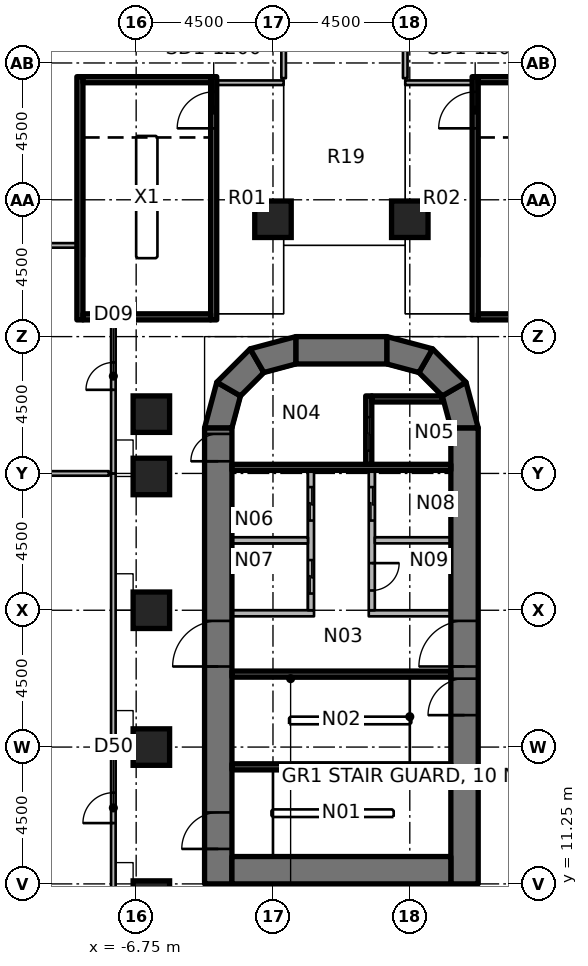
"""IFC4 building model, lengths in metres.
Left out: names, types, materials, properties, quantities, classifications, styles, units other than length and angle.
Written with IfcOpenShell. Run it as: python <this file> out.ifc"""

import sys

from ifc_helpers import new_model, si_unit, direction, frame, frame_2d, origin, origin_2d, place, context, subcontext, project, spatial, polyline, rectangle, outline, extrude, element, fill, save


model = new_model("IFC4")
c1 = context("Model", 3, precision=1e-05, world=origin(), true_north=direction((0.0, 1.0)))
c2 = subcontext(c1, "Body", "Model", "MODEL_VIEW")
j1 = project(units=[si_unit("LENGTHUNIT", "METRE"), si_unit("PLANEANGLEUNIT", "RADIAN")], contexts=[c1])
p1 = place(None, origin())
s1 = spatial("IfcSite", under=j1, at=p1, CompositionType="ELEMENT")
p2 = place(p1, origin())
s2 = spatial("IfcBuilding", under=s1, at=p2, CompositionType="ELEMENT")
p3 = place(p2, frame((0.0, 0.0, 12.0)))
s3 = spatial("IfcBuildingStorey", under=s2, at=p3, CompositionType="ELEMENT", Elevation=12.0)
for number, where, z_axis, x_axis in (
    (1, (-6.25, 10.75, 0.0), (0.0, 0.0, 1.0), (1.0, 0.0, 0.0)),
    (2, (-6.25, 15.75, 0.0), (0.0, 0.0, 1.0), (1.0, 0.0, 0.0)),
    (3, (-6.25, 20.25, 0.0), (0.0, 0.0, 1.0), (1.0, 0.0, 0.0)),
    (4, (-6.25, 24.65, 0.0), (0.0, 0.0, 1.0), (1.0, 0.0, 0.0)),
    (5, (-6.25, 26.7, 0.0), (0.0, 0.0, 1.0), (1.0, 0.0, 0.0)),
    (6, (-2.25, 33.11, 0.0), (0.0, 0.0, 1.0), (1.0, 0.0, 0.0)),
    (7, (2.25, 33.11, 0.0), (0.0, 0.0, 1.0), (1.0, 0.0, 0.0)),
):
    element("IfcColumn", number, at=place(p3, frame(where, z_axis=z_axis, x_axis=x_axis)), inside=s3, PredefinedType="COLUMN", context=c2, shape_type="SweptSolid", body=[
        extrude(rectangle(XDim=1.2, YDim=1.2, at=origin_2d()), origin(), (0.0, 0.0, 1.0), 4.55),
    ])
p4 = place(p3, frame((-4.05, 11.25, 0.0), z_axis=(0.0, 0.0, 1.0), x_axis=(0.0, 1.0, 0.0)))
e8 = element("IfcWall", 8, at=p4, inside=s3, PredefinedType="SHEAR", context=c2, shape_type="SweptSolid", body=[
    extrude(rectangle(XDim=15.0, YDim=0.9, at=frame_2d((7.5, 0.0))), origin(), (0.0, 0.0, 1.0), 5.0),
])
p5 = place(p4, frame((7.15, 0.0, 0.0)))
e9 = element("IfcOpeningElement", 9, at=p5, cuts=e8, PredefinedType="OPENING", context=c2, shape_type="SweptSolid", body=[
    extrude(rectangle(XDim=1.5, YDim=2.3, at=frame_2d((0.75, 1.15))), frame((0.0, 0.46, 0.0), z_axis=(0.0, -1.0, 0.0), x_axis=(1.0, 0.0, 0.0)), (0.0, 0.0, 1.0), 0.92),
])
p6 = place(p4, frame((13.9, 0.0, 0.0)))
e10 = element("IfcOpeningElement", 10, at=p6, cuts=e8, PredefinedType="OPENING", context=c2, shape_type="SweptSolid", body=[
    extrude(rectangle(XDim=0.9, YDim=2.1, at=frame_2d((0.45, 1.05))), frame((0.0, 0.46, 0.0), z_axis=(0.0, -1.0, 0.0), x_axis=(1.0, 0.0, 0.0)), (0.0, 0.0, 1.0), 0.92),
])
p7 = place(p4, frame((1.15, 0.0, 0.0)))
e11 = element("IfcOpeningElement", 11, at=p7, cuts=e8, PredefinedType="OPENING", context=c2, shape_type="SweptSolid", body=[
    extrude(rectangle(XDim=1.2, YDim=2.1, at=frame_2d((0.6, 1.05))), frame((0.0, 0.46, 0.0), z_axis=(0.0, -1.0, 0.0), x_axis=(1.0, 0.0, 0.0)), (0.0, 0.0, 1.0), 0.92),
])
p8 = place(p3, frame((4.05, 11.25, 0.0), z_axis=(0.0, 0.0, 1.0), x_axis=(0.0, 1.0, 0.0)))
e12 = element("IfcWall", 12, at=p8, inside=s3, PredefinedType="SHEAR", context=c2, shape_type="SweptSolid", body=[
    extrude(rectangle(XDim=15.0, YDim=0.9, at=frame_2d((7.5, 0.0))), origin(), (0.0, 0.0, 1.0), 5.0),
])
p9 = place(p8, frame((7.15, 0.0, 0.0)))
e13 = element("IfcOpeningElement", 13, at=p9, cuts=e12, PredefinedType="OPENING", context=c2, shape_type="SweptSolid", body=[
    extrude(rectangle(XDim=1.5, YDim=2.3, at=frame_2d((0.75, 1.15))), frame((0.0, 0.46, 0.0), z_axis=(0.0, -1.0, 0.0), x_axis=(1.0, 0.0, 0.0)), (0.0, 0.0, 1.0), 0.92),
])
p10 = place(p8, frame((5.55, 0.0, 0.0)))
e14 = element("IfcOpeningElement", 14, at=p10, cuts=e12, PredefinedType="OPENING", context=c2, shape_type="SweptSolid", body=[
    extrude(rectangle(XDim=1.2, YDim=2.1, at=frame_2d((0.6, 1.05))), frame((0.0, 0.46, 0.0), z_axis=(0.0, -1.0, 0.0), x_axis=(1.0, 0.0, 0.0)), (0.0, 0.0, 1.0), 0.92),
])
p11 = place(p3, frame((-3.6, 11.7, 0.0), z_axis=(0.0, 0.0, 1.0), x_axis=(1.0, 0.0, 0.0)))
e15 = element("IfcWall", 15, at=p11, inside=s3, PredefinedType="SHEAR", context=c2, shape_type="SweptSolid", body=[
    extrude(rectangle(XDim=7.2, YDim=0.9, at=frame_2d((3.6, 0.0))), origin(), (0.0, 0.0, 1.0), 5.0),
])
p12 = place(p3, frame((-1.5, 28.8, 0.0), z_axis=(0.0, 0.0, 1.0), x_axis=(1.0, 0.0, 0.0)))
e16 = element("IfcWall", 16, at=p12, inside=s3, PredefinedType="SHEAR", context=c2, shape_type="SweptSolid", body=[
    extrude(rectangle(XDim=3.0, YDim=0.9, at=frame_2d((1.5, 0.0))), origin(), (0.0, 0.0, 1.0), 5.0),
])
p13 = place(p3, origin())
e17 = element("IfcWall", 17, at=p13, inside=s3, PredefinedType="SHEAR", context=c2, shape_type="SweptSolid", body=[
    extrude(outline(polyline([(-4.5, 26.25), (-4.098, 27.75), (-3.319, 27.3), (-3.6, 26.25), (-4.5, 26.25)])), origin(), (0.0, 0.0, 1.0), 5.0),
])
p14 = place(p3, origin())
e18 = element("IfcWall", 18, at=p14, inside=s3, PredefinedType="SHEAR", context=c2, shape_type="SweptSolid", body=[
    extrude(outline(polyline([(-4.098, 27.75), (-3.0, 28.848), (-2.55, 28.069), (-3.319, 27.3), (-4.098, 27.75)])), origin(), (0.0, 0.0, 1.0), 5.0),
])
p15 = place(p3, origin())
e19 = element("IfcWall", 19, at=p15, inside=s3, PredefinedType="SHEAR", context=c2, shape_type="SweptSolid", body=[
    extrude(outline(polyline([(-3.0, 28.848), (-1.5, 29.25), (-1.5, 28.35), (-2.55, 28.069), (-3.0, 28.848)])), origin(), (0.0, 0.0, 1.0), 5.0),
])
p16 = place(p3, origin())
e20 = element("IfcWall", 20, at=p16, inside=s3, PredefinedType="SHEAR", context=c2, shape_type="SweptSolid", body=[
    extrude(outline(polyline([(4.5, 26.25), (4.098, 27.75), (3.319, 27.3), (3.6, 26.25), (4.5, 26.25)])), origin(), (0.0, 0.0, 1.0), 5.0),
])
p17 = place(p3, origin())
e21 = element("IfcWall", 21, at=p17, inside=s3, PredefinedType="SHEAR", context=c2, shape_type="SweptSolid", body=[
    extrude(outline(polyline([(4.098, 27.75), (3.0, 28.848), (2.55, 28.069), (3.319, 27.3), (4.098, 27.75)])), origin(), (0.0, 0.0, 1.0), 5.0),
])
p18 = place(p3, origin())
e22 = element("IfcWall", 22, at=p18, inside=s3, PredefinedType="SHEAR", context=c2, shape_type="SweptSolid", body=[
    extrude(outline(polyline([(3.0, 28.848), (1.5, 29.25), (1.5, 28.35), (2.55, 28.069), (3.0, 28.848)])), origin(), (0.0, 0.0, 1.0), 5.0),
])
p19 = place(p3, frame((-3.6, 24.95, 0.0), z_axis=(0.0, 0.0, 1.0), x_axis=(1.0, 0.0, 0.0)))
e23 = element("IfcWall", 23, at=p19, inside=s3, PredefinedType="SHEAR", context=c2, shape_type="SweptSolid", body=[
    extrude(rectangle(XDim=7.2, YDim=0.2, at=frame_2d((3.6, 0.0))), origin(), (0.0, 0.0, 1.0), 4.55),
])
p20 = place(p3, frame((0.9, 27.3, 0.0), z_axis=(0.0, 0.0, 1.0), x_axis=(0.0, -1.0, 0.0)))
e24 = element("IfcWall", 24, at=p20, inside=s3, PredefinedType="SHEAR", context=c2, shape_type="SweptSolid", body=[
    extrude(rectangle(XDim=2.25, YDim=0.2, at=frame_2d((1.125, 0.0))), origin(), (0.0, 0.0, 1.0), 4.55),
])
p21 = place(p20, frame((0.7, 0.0, 0.0)))
e25 = element("IfcOpeningElement", 25, at=p21, cuts=e24, PredefinedType="OPENING", context=c2, shape_type="SweptSolid", body=[
    extrude(rectangle(XDim=1.1, YDim=2.3, at=frame_2d((0.55, 1.15))), frame((0.0, 0.11, 0.0), z_axis=(0.0, -1.0, 0.0), x_axis=(1.0, 0.0, 0.0)), (0.0, 0.0, 1.0), 0.22),
])
p22 = place(p3, origin())
e26 = element("IfcWall", 26, at=p22, inside=s3, PredefinedType="SHEAR", context=c2, shape_type="SweptSolid", body=[
    extrude(outline(polyline([(1.0, 27.1), (3.341, 27.1), (3.291, 27.284), (3.275, 27.3), (1.0, 27.3), (1.0, 27.1)])), origin(), (0.0, 0.0, 1.0), 4.55),
])
for number, where, z_axis, x_axis in (
    (27, (-3.6, 18.15, 0.0), (0.0, 0.0, 1.0), (1.0, 0.0, 0.0)),
    (28, (-3.6, 15.1, 0.0), (0.0, 0.0, 1.0), (1.0, 0.0, 0.0)),
):
    element("IfcWall", number, at=place(p3, frame(where, z_axis=z_axis, x_axis=x_axis)), inside=s3, PredefinedType="SHEAR", context=c2, shape_type="SweptSolid", body=[
        extrude(rectangle(XDim=7.2, YDim=0.2, at=frame_2d((3.6, 0.0))), origin(), (0.0, 0.0, 1.0), 4.55),
    ])
p23 = place(p3, frame((-3.6, 20.15, 0.0), z_axis=(0.0, 0.0, 1.0), x_axis=(1.0, 0.0, 0.0)))
e29 = element("IfcWall", 29, at=p23, inside=s3, PredefinedType="PARTITIONING", context=c2, shape_type="SweptSolid", body=[
    extrude(rectangle(XDim=2.7, YDim=0.2, at=frame_2d((1.35, 0.0))), origin(), (0.0, 0.0, 1.0), 4.55),
])
p24 = place(p3, frame((-1.0, 24.85, 0.0), z_axis=(0.0, 0.0, 1.0), x_axis=(0.0, -1.0, 0.0)))
e30 = element("IfcWall", 30, at=p24, inside=s3, PredefinedType="PARTITIONING", context=c2, shape_type="SweptSolid", body=[
    extrude(rectangle(XDim=4.6, YDim=0.2, at=frame_2d((2.3, 0.0))), origin(), (0.0, 0.0, 1.0), 4.55),
])
p25 = place(p24, frame((0.55, 0.0, 0.0)))
e31 = element("IfcOpeningElement", 31, at=p25, cuts=e30, PredefinedType="OPENING", context=c2, shape_type="SweptSolid", body=[
    extrude(rectangle(XDim=1.1, YDim=2.3, at=frame_2d((0.55, 1.15))), frame((0.0, 0.11, 0.0), z_axis=(0.0, -1.0, 0.0), x_axis=(1.0, 0.0, 0.0)), (0.0, 0.0, 1.0), 0.22),
])
p26 = place(p24, frame((2.95, 0.0, 0.0)))
e32 = element("IfcOpeningElement", 32, at=p26, cuts=e30, PredefinedType="OPENING", context=c2, shape_type="SweptSolid", body=[
    extrude(rectangle(XDim=1.1, YDim=2.3, at=frame_2d((0.55, 1.15))), frame((0.0, 0.11, 0.0), z_axis=(0.0, -1.0, 0.0), x_axis=(1.0, 0.0, 0.0)), (0.0, 0.0, 1.0), 0.22),
])
p27 = place(p3, frame((0.9, 20.15, 0.0), z_axis=(0.0, 0.0, 1.0), x_axis=(1.0, 0.0, 0.0)))
e33 = element("IfcWall", 33, at=p27, inside=s3, PredefinedType="PARTITIONING", context=c2, shape_type="SweptSolid", body=[
    extrude(rectangle(XDim=2.7, YDim=0.2, at=frame_2d((1.35, 0.0))), origin(), (0.0, 0.0, 1.0), 4.55),
])
p28 = place(p3, frame((1.0, 24.85, 0.0), z_axis=(0.0, 0.0, 1.0), x_axis=(0.0, -1.0, 0.0)))
e34 = element("IfcWall", 34, at=p28, inside=s3, PredefinedType="PARTITIONING", context=c2, shape_type="SweptSolid", body=[
    extrude(rectangle(XDim=4.6, YDim=0.2, at=frame_2d((2.3, 0.0))), origin(), (0.0, 0.0, 1.0), 4.55),
])
p29 = place(p28, frame((0.55, 0.0, 0.0)))
e35 = element("IfcOpeningElement", 35, at=p29, cuts=e34, PredefinedType="OPENING", context=c2, shape_type="SweptSolid", body=[
    extrude(rectangle(XDim=1.1, YDim=2.3, at=frame_2d((0.55, 1.15))), frame((0.0, 0.11, 0.0), z_axis=(0.0, -1.0, 0.0), x_axis=(1.0, 0.0, 0.0)), (0.0, 0.0, 1.0), 0.22),
])
p30 = place(p28, frame((3.05, 0.0, 0.0)))
e36 = element("IfcOpeningElement", 36, at=p30, cuts=e34, PredefinedType="OPENING", context=c2, shape_type="SweptSolid", body=[
    extrude(rectangle(XDim=0.9, YDim=2.1, at=frame_2d((0.45, 1.05))), frame((0.0, 0.11, 0.0), z_axis=(0.0, -1.0, 0.0), x_axis=(1.0, 0.0, 0.0)), (0.0, 0.0, 1.0), 0.22),
])
for number, where, z_axis, x_axis in (
    (37, (-3.6, 22.55, 0.0), (0.0, 0.0, 1.0), (1.0, 0.0, 0.0)),
    (38, (1.1, 22.55, 0.0), (0.0, 0.0, 1.0), (1.0, 0.0, 0.0)),
):
    element("IfcWall", number, at=place(p3, frame(where, z_axis=z_axis, x_axis=x_axis)), inside=s3, PredefinedType="PARTITIONING", context=c2, shape_type="SweptSolid", body=[
        extrude(rectangle(XDim=2.5, YDim=0.2, at=frame_2d((1.25, 0.0))), origin(), (0.0, 0.0, 1.0), 4.55),
    ])
p31 = place(p3, frame((-8.6, 29.8, 0.0), z_axis=(0.0, 0.0, 1.0), x_axis=(0.0, 1.0, 0.0)))
e39 = element("IfcWall", 39, at=p31, inside=s3, PredefinedType="SHEAR", context=c2, shape_type="SweptSolid", body=[
    extrude(rectangle(XDim=8.0, YDim=0.2, at=frame_2d((4.0, 0.0))), origin(), (0.0, 0.0, 1.0), 4.55),
])
p32 = place(p3, frame((-4.2, 29.8, 0.0), z_axis=(0.0, 0.0, 1.0), x_axis=(0.0, 1.0, 0.0)))
e40 = element("IfcWall", 40, at=p32, inside=s3, PredefinedType="SHEAR", context=c2, shape_type="SweptSolid", body=[
    extrude(rectangle(XDim=8.0, YDim=0.2, at=frame_2d((4.0, 0.0))), origin(), (0.0, 0.0, 1.0), 4.55),
])
p33 = place(p32, frame((6.3, 0.0, 0.0)))
e41 = element("IfcOpeningElement", 41, at=p33, cuts=e40, PredefinedType="OPENING", context=c2, shape_type="SweptSolid", body=[
    extrude(rectangle(XDim=1.2, YDim=2.1, at=frame_2d((0.6, 1.05))), frame((0.0, 0.11, 0.0), z_axis=(0.0, -1.0, 0.0), x_axis=(1.0, 0.0, 0.0)), (0.0, 0.0, 1.0), 0.22),
])
for number, where, z_axis, x_axis in (
    (42, (-8.5, 29.9, 0.0), (0.0, 0.0, 1.0), (1.0, 0.0, 0.0)),
    (43, (-8.5, 37.7, 0.0), (0.0, 0.0, 1.0), (1.0, 0.0, 0.0)),
):
    element("IfcWall", number, at=place(p3, frame(where, z_axis=z_axis, x_axis=x_axis)), inside=s3, PredefinedType="SHEAR", context=c2, shape_type="SweptSolid", body=[
        extrude(rectangle(XDim=4.2, YDim=0.2, at=frame_2d((2.1, 0.0))), origin(), (0.0, 0.0, 1.0), 4.55),
    ])
p34 = place(p3, frame((4.4, 29.8, 0.0), z_axis=(0.0, 0.0, 1.0), x_axis=(0.0, 1.0, 0.0)))
e44 = element("IfcWall", 44, at=p34, inside=s3, PredefinedType="SHEAR", context=c2, shape_type="SweptSolid", body=[
    extrude(rectangle(XDim=8.0, YDim=0.2, at=frame_2d((4.0, 0.0))), origin(), (0.0, 0.0, 1.0), 4.55),
])
p35 = place(p34, frame((6.3, 0.0, 0.0)))
e45 = element("IfcOpeningElement", 45, at=p35, cuts=e44, PredefinedType="OPENING", context=c2, shape_type="SweptSolid", body=[
    extrude(rectangle(XDim=1.2, YDim=2.1, at=frame_2d((0.6, 1.05))), frame((0.0, 0.11, 0.0), z_axis=(0.0, -1.0, 0.0), x_axis=(1.0, 0.0, 0.0)), (0.0, 0.0, 1.0), 0.22),
])
for number, where, z_axis, x_axis in (
    (46, (4.5, 29.9, 0.0), (0.0, 0.0, 1.0), (1.0, 0.0, 0.0)),
    (47, (4.5, 37.7, 0.0), (0.0, 0.0, 1.0), (1.0, 0.0, 0.0)),
):
    element("IfcWall", number, at=place(p3, frame(where, z_axis=z_axis, x_axis=x_axis)), inside=s3, PredefinedType="SHEAR", context=c2, shape_type="SweptSolid", body=[
        extrude(rectangle(XDim=4.2, YDim=0.2, at=frame_2d((2.1, 0.0))), origin(), (0.0, 0.0, 1.0), 4.55),
    ])
p36 = place(p3, frame((-4.1, 37.6, 0.0), z_axis=(0.0, 0.0, 1.0), x_axis=(1.0, 0.0, 0.0)))
e48 = element("IfcWall", 48, at=p36, inside=s3, PredefinedType="PARTITIONING", context=c2, shape_type="SweptSolid", body=[
    extrude(rectangle(XDim=2.2, YDim=0.15, at=frame_2d((1.1, 0.0))), origin(), (0.0, 0.0, 1.0), 4.55),
])
p37 = place(p3, frame((2.1, 37.6, 0.0), z_axis=(0.0, 0.0, 1.0), x_axis=(1.0, 0.0, 0.0)))
e49 = element("IfcWall", 49, at=p37, inside=s3, PredefinedType="PARTITIONING", context=c2, shape_type="SweptSolid", body=[
    extrude(rectangle(XDim=2.2, YDim=0.15, at=frame_2d((1.1, 0.0))), origin(), (0.0, 0.0, 1.0), 4.55),
])
p38 = place(p3, frame((-7.5, 8.25, 0.0), z_axis=(0.0, 0.0, 1.0), x_axis=(0.0, 1.0, 0.0)))
e50 = element("IfcWall", 50, at=p38, inside=s3, PredefinedType="PARTITIONING", context=c2, shape_type="SweptSolid", body=[
    extrude(rectangle(XDim=16.5, YDim=0.15, at=frame_2d((8.25, 0.0))), origin(), (0.0, 0.0, 1.0), 4.55),
])
p39 = place(p38, frame((5.0, 0.0, 0.0)))
e51 = element("IfcOpeningElement", 51, at=p39, cuts=e50, PredefinedType="OPENING", context=c2, shape_type="SweptSolid", body=[
    extrude(rectangle(XDim=1.0, YDim=2.1, at=frame_2d((0.5, 1.05))), frame((0.0, 0.085, 0.0), z_axis=(0.0, -1.0, 0.0), x_axis=(1.0, 0.0, 0.0)), (0.0, 0.0, 1.0), 0.17),
])
p40 = place(p3, frame((-7.5, 24.75, 0.0), z_axis=(0.0, 0.0, 1.0), x_axis=(0.0, 1.0, 0.0)))
e52 = element("IfcWall", 52, at=p40, inside=s3, PredefinedType="PARTITIONING", context=c2, shape_type="SweptSolid", body=[
    extrude(rectangle(XDim=5.25, YDim=0.15, at=frame_2d((2.625, 0.0))), origin(), (0.0, 0.0, 1.0), 4.55),
])
p41 = place(p40, frame((2.75, 0.0, 0.0)))
e53 = element("IfcOpeningElement", 53, at=p41, cuts=e52, PredefinedType="OPENING", context=c2, shape_type="SweptSolid", body=[
    extrude(rectangle(XDim=0.9, YDim=2.1, at=frame_2d((0.45, 1.05))), frame((0.0, 0.085, 0.0), z_axis=(0.0, -1.0, 0.0), x_axis=(1.0, 0.0, 0.0)), (0.0, 0.0, 1.0), 0.17),
])
p42 = place(p3, frame((2.1, 41.55, 0.0), z_axis=(0.0, 0.0, 1.0), x_axis=(0.0, -1.0, 0.0)))
e54 = element("IfcWall", 54, at=p42, inside=s3, PredefinedType="PARTITIONING", context=c2, shape_type="SweptSolid", body=[
    extrude(rectangle(XDim=3.8, YDim=0.15, at=frame_2d((1.9, 0.0))), origin(), (0.0, 0.0, 1.0), 4.55),
])
p43 = place(p3, frame((-1.9, 37.75, 0.0), z_axis=(0.0, 0.0, 1.0), x_axis=(0.0, 1.0, 0.0)))
e55 = element("IfcWall", 55, at=p43, inside=s3, PredefinedType="PARTITIONING", context=c2, shape_type="SweptSolid", body=[
    extrude(rectangle(XDim=8.3, YDim=0.15, at=frame_2d((4.15, 0.0))), origin(), (0.0, 0.0, 1.0), 4.55),
])
p44 = place(p43, frame((3.65, 0.0, 0.0)))
e56 = element("IfcOpeningElement", 56, at=p44, cuts=e55, PredefinedType="OPENING", context=c2, shape_type="SweptSolid", body=[
    extrude(rectangle(XDim=1.0, YDim=2.1, at=frame_2d((0.5, 1.05))), frame((0.0, 0.085, 0.0), z_axis=(0.0, -1.0, 0.0), x_axis=(1.0, 0.0, 0.0)), (0.0, 0.0, 1.0), 0.17),
])
p45 = place(p3, frame((-19.05, 24.75, 0.0), z_axis=(0.0, 0.0, 1.0), x_axis=(1.0, 0.0, 0.0)))
e57 = element("IfcWall", 57, at=p45, inside=s3, PredefinedType="PARTITIONING", context=c2, shape_type="SweptSolid", body=[
    extrude(rectangle(XDim=11.4, YDim=0.15, at=frame_2d((5.7, 0.0))), origin(), (0.0, 0.0, 1.0), 4.55),
])
p46 = place(p3, frame((-19.65, 32.25, 0.0), z_axis=(0.0, 0.0, 1.0), x_axis=(1.0, 0.0, 0.0)))
e58 = element("IfcWall", 58, at=p46, inside=s3, PredefinedType="PARTITIONING", context=c2, shape_type="SweptSolid", body=[
    extrude(rectangle(XDim=10.95, YDim=0.15, at=frame_2d((5.475, 0.0))), origin(), (0.0, 0.0, 1.0), 4.55),
])
p47 = place(p5, origin())
e59 = element("IfcDoor", 59, at=p47, inside=s3, OperationType="DOUBLE_DOOR_SINGLE_SWING", PredefinedType="DOOR", context=c2, shape_type="SweptSolid", body=[
    extrude(rectangle(XDim=1.5, YDim=2.3, at=frame_2d((0.75, 1.15))), frame((0.0, 0.025, 0.0), z_axis=(0.0, -1.0, 0.0), x_axis=(1.0, 0.0, 0.0)), (0.0, 0.0, 1.0), 0.05),
])
fill(e9, e59)
p48 = place(p9, origin())
e60 = element("IfcDoor", 60, at=p48, inside=s3, OperationType="DOUBLE_DOOR_SINGLE_SWING", PredefinedType="DOOR", context=c2, shape_type="SweptSolid", body=[
    extrude(rectangle(XDim=1.5, YDim=2.3, at=frame_2d((0.75, 1.15))), frame((0.0, 0.025, 0.0), z_axis=(0.0, -1.0, 0.0), x_axis=(1.0, 0.0, 0.0)), (0.0, 0.0, 1.0), 0.05),
])
fill(e13, e60)
p49 = place(p6, origin())
e61 = element("IfcDoor", 61, at=p49, inside=s3, OperationType="SINGLE_SWING_RIGHT", PredefinedType="DOOR", context=c2, shape_type="SweptSolid", body=[
    extrude(rectangle(XDim=0.9, YDim=2.1, at=frame_2d((0.45, 1.05))), frame((0.0, 0.025, 0.0), z_axis=(0.0, -1.0, 0.0), x_axis=(1.0, 0.0, 0.0)), (0.0, 0.0, 1.0), 0.05),
])
fill(e10, e61)
p50 = place(p10, origin())
e62 = element("IfcDoor", 62, at=p50, inside=s3, OperationType="SINGLE_SWING_RIGHT", PredefinedType="DOOR", context=c2, shape_type="SweptSolid", body=[
    extrude(rectangle(XDim=1.2, YDim=2.1, at=frame_2d((0.6, 1.05))), frame((0.0, 0.025, 0.0), z_axis=(0.0, -1.0, 0.0), x_axis=(1.0, 0.0, 0.0)), (0.0, 0.0, 1.0), 0.05),
])
fill(e14, e62)
p51 = place(p7, origin())
e63 = element("IfcDoor", 63, at=p51, inside=s3, OperationType="SINGLE_SWING_RIGHT", PredefinedType="DOOR", context=c2, shape_type="SweptSolid", body=[
    extrude(rectangle(XDim=1.2, YDim=2.1, at=frame_2d((0.6, 1.05))), frame((0.0, 0.025, 0.0), z_axis=(0.0, -1.0, 0.0), x_axis=(1.0, 0.0, 0.0)), (0.0, 0.0, 1.0), 0.05),
])
fill(e11, e63)
p52 = place(p21, origin())
e64 = element("IfcDoor", 64, at=p52, inside=s3, OperationType="DOUBLE_DOOR_SLIDING", PredefinedType="DOOR", context=c2, shape_type="SweptSolid", body=[
    extrude(rectangle(XDim=1.1, YDim=2.3, at=frame_2d((0.55, 1.15))), frame((0.0, 0.025, 0.0), z_axis=(0.0, -1.0, 0.0), x_axis=(1.0, 0.0, 0.0)), (0.0, 0.0, 1.0), 0.05),
])
fill(e25, e64)
p53 = place(p25, origin())
e65 = element("IfcDoor", 65, at=p53, inside=s3, OperationType="DOUBLE_DOOR_SLIDING", PredefinedType="DOOR", context=c2, shape_type="SweptSolid", body=[
    extrude(rectangle(XDim=1.1, YDim=2.3, at=frame_2d((0.55, 1.15))), frame((0.0, 0.025, 0.0), z_axis=(0.0, -1.0, 0.0), x_axis=(1.0, 0.0, 0.0)), (0.0, 0.0, 1.0), 0.05),
])
fill(e31, e65)
p54 = place(p26, origin())
e66 = element("IfcDoor", 66, at=p54, inside=s3, OperationType="DOUBLE_DOOR_SLIDING", PredefinedType="DOOR", context=c2, shape_type="SweptSolid", body=[
    extrude(rectangle(XDim=1.1, YDim=2.3, at=frame_2d((0.55, 1.15))), frame((0.0, 0.025, 0.0), z_axis=(0.0, -1.0, 0.0), x_axis=(1.0, 0.0, 0.0)), (0.0, 0.0, 1.0), 0.05),
])
fill(e32, e66)
p55 = place(p29, origin())
e67 = element("IfcDoor", 67, at=p55, inside=s3, OperationType="DOUBLE_DOOR_SLIDING", PredefinedType="DOOR", context=c2, shape_type="SweptSolid", body=[
    extrude(rectangle(XDim=1.1, YDim=2.3, at=frame_2d((0.55, 1.15))), frame((0.0, 0.025, 0.0), z_axis=(0.0, -1.0, 0.0), x_axis=(1.0, 0.0, 0.0)), (0.0, 0.0, 1.0), 0.05),
])
fill(e35, e67)
p56 = place(p30, origin())
e68 = element("IfcDoor", 68, at=p56, inside=s3, OperationType="SINGLE_SWING_RIGHT", PredefinedType="DOOR", context=c2, shape_type="SweptSolid", body=[
    extrude(rectangle(XDim=0.9, YDim=2.1, at=frame_2d((0.45, 1.05))), frame((0.0, 0.025, 0.0), z_axis=(0.0, -1.0, 0.0), x_axis=(1.0, 0.0, 0.0)), (0.0, 0.0, 1.0), 0.05),
])
fill(e36, e68)
p57 = place(p33, origin())
e69 = element("IfcDoor", 69, at=p57, inside=s3, OperationType="SINGLE_SWING_RIGHT", PredefinedType="DOOR", context=c2, shape_type="SweptSolid", body=[
    extrude(rectangle(XDim=1.2, YDim=2.1, at=frame_2d((0.6, 1.05))), frame((0.0, 0.025, 0.0), z_axis=(0.0, -1.0, 0.0), x_axis=(1.0, 0.0, 0.0)), (0.0, 0.0, 1.0), 0.05),
])
fill(e41, e69)
p58 = place(p35, origin())
e70 = element("IfcDoor", 70, at=p58, inside=s3, OperationType="SINGLE_SWING_LEFT", PredefinedType="DOOR", context=c2, shape_type="SweptSolid", body=[
    extrude(rectangle(XDim=1.2, YDim=2.1, at=frame_2d((0.6, 1.05))), frame((0.0, 0.025, 0.0), z_axis=(0.0, -1.0, 0.0), x_axis=(1.0, 0.0, 0.0)), (0.0, 0.0, 1.0), 0.05),
])
fill(e45, e70)
p59 = place(p39, origin())
e71 = element("IfcDoor", 71, at=p59, inside=s3, OperationType="SINGLE_SWING_LEFT", PredefinedType="DOOR", context=c2, shape_type="SweptSolid", body=[
    extrude(rectangle(XDim=1.0, YDim=2.1, at=frame_2d((0.5, 1.05))), frame((0.0, 0.025, 0.0), z_axis=(0.0, -1.0, 0.0), x_axis=(1.0, 0.0, 0.0)), (0.0, 0.0, 1.0), 0.05),
])
fill(e51, e71)
p60 = place(p41, origin())
e72 = element("IfcDoor", 72, at=p60, inside=s3, OperationType="SINGLE_SWING_LEFT", PredefinedType="DOOR", context=c2, shape_type="SweptSolid", body=[
    extrude(rectangle(XDim=0.9, YDim=2.1, at=frame_2d((0.45, 1.05))), frame((0.0, 0.025, 0.0), z_axis=(0.0, -1.0, 0.0), x_axis=(1.0, 0.0, 0.0)), (0.0, 0.0, 1.0), 0.05),
])
fill(e53, e72)
save(model, sys.argv[1])
